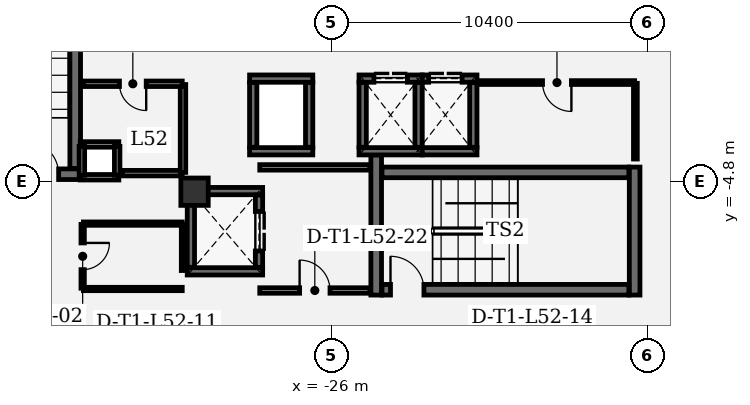
"""IFC4 building model, lengths in metres.
Left out: names, types, materials, properties, quantities, classifications, styles, units other than length and angle.
Written with IfcOpenShell. Run it as: python <this file> out.ifc"""

import sys

from ifc_helpers import new_model, si_unit, direction, frame, frame_2d, origin, origin_2d, place, context, subcontext, project, spatial, rectangle, extrude, element, fill, save


model = new_model("IFC4")
c1 = context("Model", 3, precision=1e-05, world=origin(), true_north=direction((0.0, 1.0)))
c2 = subcontext(c1, "Body", "Model", "MODEL_VIEW")
j1 = project(units=[si_unit("LENGTHUNIT", "METRE"), si_unit("PLANEANGLEUNIT", "RADIAN")], contexts=[c1])
p1 = place(None, origin())
s1 = spatial("IfcSite", under=j1, at=p1, CompositionType="ELEMENT")
p2 = place(p1, origin())
s2 = spatial("IfcBuilding", under=s1, at=p2, CompositionType="ELEMENT")
p3 = place(p2, frame((0.0, 0.0, 225.3)))
s3 = spatial("IfcBuildingStorey", under=s2, at=p3, CompositionType="ELEMENT", Elevation=225.3)
p4 = place(p3, frame((-30.5, -5.15, 0.0), z_axis=(0.0, 0.0, 1.0), x_axis=(1.0, 0.0, 0.0)))
e1 = element("IfcColumn", 1, at=p4, inside=s3, PredefinedType="COLUMN", context=c2, shape_type="SweptSolid", body=[
    extrude(rectangle(XDim=0.9, YDim=0.9, at=origin_2d()), origin(), (0.0, 0.0, 1.0), 4.05),
])
p5 = place(p3, frame((-24.525, -3.94, 0.0), z_axis=(0.0, 0.0, 1.0), x_axis=(0.0, -1.0, 0.0)))
e2 = element("IfcWall", 2, at=p5, inside=s3, PredefinedType="SHEAR", context=c2, shape_type="SweptSolid", body=[
    extrude(rectangle(XDim=4.61, YDim=0.35, at=frame_2d((2.305, 0.0))), origin(), (0.0, 0.0, 1.0), 3.78),
])
p6 = place(p3, frame((-16.025, -8.55, 0.0), z_axis=(0.0, 0.0, 1.0), x_axis=(0.0, 1.0, 0.0)))
e3 = element("IfcWall", 3, at=p6, inside=s3, PredefinedType="SHEAR", context=c2, shape_type="SweptSolid", body=[
    extrude(rectangle(XDim=4.21, YDim=0.35, at=frame_2d((2.105, 0.0))), origin(), (0.0, 0.0, 1.0), 3.78),
])
p7 = place(p3, frame((-24.335, -8.375, 0.0), z_axis=(0.0, 0.0, 1.0), x_axis=(1.0, 0.0, 0.0)))
e4 = element("IfcWall", 4, at=p7, inside=s3, PredefinedType="SHEAR", context=c2, shape_type="SweptSolid", body=[
    extrude(rectangle(XDim=8.12, YDim=0.35, at=frame_2d((4.06, 0.0))), origin(), (0.0, 0.0, 1.0), 3.78),
])
p8 = place(p7, frame((0.28, 0.0, 0.0)))
e5 = element("IfcOpeningElement", 5, at=p8, cuts=e4, PredefinedType="OPENING", context=c2, shape_type="SweptSolid", body=[
    extrude(rectangle(XDim=1.1, YDim=2.2, at=frame_2d((0.55, 1.1))), frame((0.0, 0.185, 0.0), z_axis=(0.0, -1.0, 0.0), x_axis=(1.0, 0.0, 0.0)), (0.0, 0.0, 1.0), 0.37),
])
p9 = place(p3, frame((-16.215, -4.515, 0.0), z_axis=(0.0, 0.0, 1.0), x_axis=(-1.0, 0.0, 0.0)))
e6 = element("IfcWall", 6, at=p9, inside=s3, PredefinedType="SHEAR", context=c2, shape_type="SweptSolid", body=[
    extrude(rectangle(XDim=8.12, YDim=0.35, at=frame_2d((4.06, 0.0))), origin(), (0.0, 0.0, 1.0), 3.78),
])
p10 = place(p3, frame((-38.46, -4.575, 0.0), z_axis=(0.0, 0.0, 1.0), x_axis=(1.0, 0.0, 0.0)))
e7 = element("IfcWall", 7, at=p10, inside=s3, PredefinedType="SHEAR", context=c2, shape_type="SweptSolid", body=[
    extrude(rectangle(XDim=4.21, YDim=0.35, at=frame_2d((2.105, 0.0))), origin(), (0.0, 0.0, 1.0), 3.78),
])
p11 = place(p10, frame((2.39, 0.0, 0.0)))
e8 = element("IfcOpeningElement", 8, at=p11, cuts=e7, PredefinedType="OPENING", context=c2, shape_type="SweptSolid", body=[
    extrude(rectangle(XDim=1.1, YDim=2.2, at=frame_2d((0.55, 1.1))), frame((0.0, 0.185, 0.0), z_axis=(0.0, -1.0, 0.0), x_axis=(1.0, 0.0, 0.0)), (0.0, 0.0, 1.0), 0.37),
])
p12 = place(p3, frame((-34.425, -4.385, 0.0), z_axis=(0.0, 0.0, 1.0), x_axis=(0.0, 1.0, 0.0)))
e9 = element("IfcWall", 9, at=p12, inside=s3, PredefinedType="SHEAR", context=c2, shape_type="SweptSolid", body=[
    extrude(rectangle(XDim=8.77, YDim=0.35, at=frame_2d((4.385, 0.0))), origin(), (0.0, 0.0, 1.0), 3.78),
])
for number, where, z_axis, x_axis in (
    (10, (-28.26, -7.77, 0.0), (0.0, 0.0, 1.0), (-1.0, 0.0, 0.0)),
    (11, (-30.74, -5.13, 0.0), (0.0, 0.0, 1.0), (1.0, 0.0, 0.0)),
):
    element("IfcWall", number, at=place(p3, frame(where, z_axis=z_axis, x_axis=x_axis)), inside=s3, PredefinedType="SHEAR", context=c2, shape_type="SweptSolid", body=[
        extrude(rectangle(XDim=2.48, YDim=0.24, at=frame_2d((1.24, 0.0))), origin(), (0.0, 0.0, 1.0), 3.78),
    ])
p13 = place(p3, frame((-30.62, -7.638, 0.0), z_axis=(0.0, 0.0, 1.0), x_axis=(0.0, 1.0, 0.0)))
e12 = element("IfcWall", 12, at=p13, inside=s3, PredefinedType="SHEAR", context=c2, shape_type="SweptSolid", body=[
    extrude(rectangle(XDim=2.376, YDim=0.24, at=frame_2d((1.188, 0.0))), origin(), (0.0, 0.0, 1.0), 3.78),
])
p14 = place(p3, frame((-28.38, -5.262, 0.0), z_axis=(0.0, 0.0, 1.0), x_axis=(0.0, -1.0, 0.0)))
e13 = element("IfcWall", 13, at=p14, inside=s3, PredefinedType="SHEAR", context=c2, shape_type="SweptSolid", body=[
    extrude(rectangle(XDim=2.376, YDim=0.24, at=frame_2d((1.188, 0.0))), origin(), (0.0, 0.0, 1.0), 3.78),
])
p15 = place(p14, frame((0.538, 0.0, 0.0)))
e14 = element("IfcOpeningElement", 14, at=p15, cuts=e13, PredefinedType="OPENING", context=c2, shape_type="SweptSolid", body=[
    extrude(rectangle(XDim=1.3, YDim=2.3, at=frame_2d((0.65, 1.15))), frame((0.0, 0.13, 0.0), z_axis=(0.0, -1.0, 0.0), x_axis=(1.0, 0.0, 0.0)), (0.0, 0.0, 1.0), 0.26),
])
for number, where, z_axis, x_axis in (
    (15, (-26.61, -3.82, 0.0), (0.0, 0.0, 1.0), (-1.0, 0.0, 0.0)),
    (16, (-28.69, -1.43, 0.0), (0.0, 0.0, 1.0), (1.0, 0.0, 0.0)),
):
    element("IfcWall", number, at=place(p3, frame(where, z_axis=z_axis, x_axis=x_axis)), inside=s3, PredefinedType="SHEAR", context=c2, shape_type="SweptSolid", body=[
        extrude(rectangle(XDim=2.08, YDim=0.24, at=frame_2d((1.04, 0.0))), origin(), (0.0, 0.0, 1.0), 3.78),
    ])
for number, where, z_axis, x_axis in (
    (17, (-28.57, -3.688, 0.0), (0.0, 0.0, 1.0), (0.0, 1.0, 0.0)),
    (18, (-26.73, -1.562, 0.0), (0.0, 0.0, 1.0), (0.0, -1.0, 0.0)),
):
    element("IfcWall", number, at=place(p3, frame(where, z_axis=z_axis, x_axis=x_axis)), inside=s3, PredefinedType="SHEAR", context=c2, shape_type="SweptSolid", body=[
        extrude(rectangle(XDim=2.126, YDim=0.24, at=frame_2d((1.063, 0.0))), origin(), (0.0, 0.0, 1.0), 3.78),
    ])
p16 = place(p3, frame((-23.01, -3.82, 0.0), z_axis=(0.0, 0.0, 1.0), x_axis=(-1.0, 0.0, 0.0)))
e19 = element("IfcWall", 19, at=p16, inside=s3, PredefinedType="SHEAR", context=c2, shape_type="SweptSolid", body=[
    extrude(rectangle(XDim=2.08, YDim=0.24, at=frame_2d((1.04, 0.0))), origin(), (0.0, 0.0, 1.0), 3.78),
])
p17 = place(p3, frame((-25.09, -1.43, 0.0), z_axis=(0.0, 0.0, 1.0), x_axis=(1.0, 0.0, 0.0)))
e20 = element("IfcWall", 20, at=p17, inside=s3, PredefinedType="SHEAR", context=c2, shape_type="SweptSolid", body=[
    extrude(rectangle(XDim=2.08, YDim=0.24, at=frame_2d((1.04, 0.0))), origin(), (0.0, 0.0, 1.0), 3.78),
])
p18 = place(p17, frame((0.49, 0.0, 0.0)))
e21 = element("IfcOpeningElement", 21, at=p18, cuts=e20, PredefinedType="OPENING", context=c2, shape_type="SweptSolid", body=[
    extrude(rectangle(XDim=1.1, YDim=2.2, at=frame_2d((0.55, 1.1))), frame((0.0, 0.13, 0.0), z_axis=(0.0, -1.0, 0.0), x_axis=(1.0, 0.0, 0.0)), (0.0, 0.0, 1.0), 0.26),
])
for number, where, z_axis, x_axis in (
    (22, (-24.97, -3.688, 0.0), (0.0, 0.0, 1.0), (0.0, 1.0, 0.0)),
    (23, (-23.13, -1.562, 0.0), (0.0, 0.0, 1.0), (0.0, -1.0, 0.0)),
):
    element("IfcWall", number, at=place(p3, frame(where, z_axis=z_axis, x_axis=x_axis)), inside=s3, PredefinedType="SHEAR", context=c2, shape_type="SweptSolid", body=[
        extrude(rectangle(XDim=2.126, YDim=0.24, at=frame_2d((1.063, 0.0))), origin(), (0.0, 0.0, 1.0), 3.78),
    ])
p19 = place(p3, frame((-21.21, -3.82, 0.0), z_axis=(0.0, 0.0, 1.0), x_axis=(-1.0, 0.0, 0.0)))
e24 = element("IfcWall", 24, at=p19, inside=s3, PredefinedType="SHEAR", context=c2, shape_type="SweptSolid", body=[
    extrude(rectangle(XDim=1.8, YDim=0.24, at=frame_2d((0.9, 0.0))), origin(), (0.0, 0.0, 1.0), 3.78),
])
p20 = place(p3, frame((-23.01, -1.43, 0.0), z_axis=(0.0, 0.0, 1.0), x_axis=(1.0, 0.0, 0.0)))
e25 = element("IfcWall", 25, at=p20, inside=s3, PredefinedType="SHEAR", context=c2, shape_type="SweptSolid", body=[
    extrude(rectangle(XDim=1.8, YDim=0.24, at=frame_2d((0.9, 0.0))), origin(), (0.0, 0.0, 1.0), 3.78),
])
p21 = place(p20, frame((0.21, 0.0, 0.0)))
e26 = element("IfcOpeningElement", 26, at=p21, cuts=e25, PredefinedType="OPENING", context=c2, shape_type="SweptSolid", body=[
    extrude(rectangle(XDim=1.1, YDim=2.2, at=frame_2d((0.55, 1.1))), frame((0.0, 0.13, 0.0), z_axis=(0.0, -1.0, 0.0), x_axis=(1.0, 0.0, 0.0)), (0.0, 0.0, 1.0), 0.26),
])
p22 = place(p3, frame((-21.33, -1.562, 0.0), z_axis=(0.0, 0.0, 1.0), x_axis=(0.0, -1.0, 0.0)))
e27 = element("IfcWall", 27, at=p22, inside=s3, PredefinedType="SHEAR", context=c2, shape_type="SweptSolid", body=[
    extrude(rectangle(XDim=2.126, YDim=0.24, at=frame_2d((1.063, 0.0))), origin(), (0.0, 0.0, 1.0), 3.78),
])
for number, where, z_axis, x_axis in (
    (28, (-32.99, -4.675, 0.0), (0.0, 0.0, 1.0), (-1.0, 0.0, 0.0)),
    (29, (-34.26, -3.595, 0.0), (0.0, 0.0, 1.0), (1.0, 0.0, 0.0)),
):
    element("IfcWall", number, at=place(p3, frame(where, z_axis=z_axis, x_axis=x_axis)), inside=s3, PredefinedType="PARTITIONING", context=c2, shape_type="SweptSolid", body=[
        extrude(rectangle(XDim=1.27, YDim=0.18, at=frame_2d((0.635, 0.0))), origin(), (0.0, 0.0, 1.0), 3.78),
    ])
for number, where, z_axis, x_axis in (
    (30, (-34.205, -4.61, 0.0), (0.0, 0.0, 1.0), (0.0, 1.0, 0.0)),
    (31, (-33.045, -3.66, 0.0), (0.0, 0.0, 1.0), (0.0, -1.0, 0.0)),
):
    element("IfcWall", number, at=place(p3, frame(where, z_axis=z_axis, x_axis=x_axis)), inside=s3, PredefinedType="PARTITIONING", context=c2, shape_type="SweptSolid", body=[
        extrude(rectangle(XDim=0.95, YDim=0.18, at=frame_2d((0.475, 0.0))), origin(), (0.0, 0.0, 1.0), 3.78),
    ])
p23 = place(p3, frame((-28.355, -8.4, 0.0), z_axis=(0.0, 0.0, 1.0), x_axis=(1.0, 0.0, 0.0)))
e32 = element("IfcWall", 32, at=p23, inside=s3, PredefinedType="PARTITIONING", context=c2, shape_type="SweptSolid", body=[
    extrude(rectangle(XDim=3.622, YDim=0.18, at=frame_2d((1.811, 0.0))), origin(), (0.0, 0.0, 1.0), 3.78),
])
p24 = place(p23, frame((1.311, 0.0, 0.0)))
e33 = element("IfcOpeningElement", 33, at=p24, cuts=e32, PredefinedType="OPENING", context=c2, shape_type="SweptSolid", body=[
    extrude(rectangle(XDim=1.0, YDim=2.15, at=frame_2d((0.5, 1.075))), frame((0.0, 0.1, 0.0), z_axis=(0.0, -1.0, 0.0), x_axis=(1.0, 0.0, 0.0)), (0.0, 0.0, 1.0), 0.2),
])
p25 = place(p3, frame((-24.733, -4.35, 0.0), z_axis=(0.0, 0.0, 1.0), x_axis=(-1.0, 0.0, 0.0)))
e34 = element("IfcWall", 34, at=p25, inside=s3, PredefinedType="PARTITIONING", context=c2, shape_type="SweptSolid", body=[
    extrude(rectangle(XDim=3.622, YDim=0.18, at=frame_2d((1.811, 0.0))), origin(), (0.0, 0.0, 1.0), 3.78),
])
p26 = place(p3, frame((-34.18, -6.225, 0.0), z_axis=(0.0, 0.0, 1.0), x_axis=(0.0, -1.0, 0.0)))
e35 = element("IfcWall", 35, at=p26, inside=s3, PredefinedType="PARTITIONING", context=c2, shape_type="SweptSolid", body=[
    extrude(rectangle(XDim=2.1, YDim=0.11, at=frame_2d((1.05, 0.0))), origin(), (0.0, 0.0, 1.0), 3.78),
])
p27 = place(p26, frame((0.61, 0.0, 0.0)))
e36 = element("IfcOpeningElement", 36, at=p27, cuts=e35, PredefinedType="OPENING", context=c2, shape_type="SweptSolid", body=[
    extrude(rectangle(XDim=0.88, YDim=2.1, at=frame_2d((0.44, 1.05))), frame((0.0, 0.065, 0.0), z_axis=(0.0, -1.0, 0.0), x_axis=(1.0, 0.0, 0.0)), (0.0, 0.0, 1.0), 0.13),
])
p28 = place(p3, frame((-34.155, -8.35, 0.0), z_axis=(0.0, 0.0, 1.0), x_axis=(1.0, 0.0, 0.0)))
e37 = element("IfcWall", 37, at=p28, inside=s3, PredefinedType="PARTITIONING", context=c2, shape_type="SweptSolid", body=[
    extrude(rectangle(XDim=3.25, YDim=0.11, at=frame_2d((1.625, 0.0))), origin(), (0.0, 0.0, 1.0), 3.344),
])
p29 = place(p3, frame((-30.88, -7.743, 0.0), z_axis=(0.0, 0.0, 1.0), x_axis=(0.0, 1.0, 0.0)))
e38 = element("IfcWall", 38, at=p29, inside=s3, PredefinedType="PARTITIONING", context=c2, shape_type="SweptSolid", body=[
    extrude(rectangle(XDim=1.518, YDim=0.11, at=frame_2d((0.759, 0.0))), origin(), (0.0, 0.0, 1.0), 3.78),
])
p30 = place(p3, frame((-30.905, -6.2, 0.0), z_axis=(0.0, 0.0, 1.0), x_axis=(-1.0, 0.0, 0.0)))
e39 = element("IfcWall", 39, at=p30, inside=s3, PredefinedType="PARTITIONING", context=c2, shape_type="SweptSolid", body=[
    extrude(rectangle(XDim=3.25, YDim=0.11, at=frame_2d((1.625, 0.0))), origin(), (0.0, 0.0, 1.0), 3.344),
])
p31 = place(p3, frame((-16.0, -4.075, 0.0), z_axis=(0.0, 0.0, 1.0), x_axis=(0.0, 1.0, 0.0)))
e40 = element("IfcWall", 40, at=p31, inside=s3, PredefinedType="PARTITIONING", context=c2, shape_type="SweptSolid", body=[
    extrude(rectangle(XDim=2.49, YDim=0.125, at=frame_2d((1.245, 0.0))), origin(), (0.0, 0.0, 1.0), 3.78),
])
p32 = place(p3, frame((-16.025, -1.56, 0.0), z_axis=(0.0, 0.0, 1.0), x_axis=(-1.0, 0.0, 0.0)))
e41 = element("IfcWall", 41, at=p32, inside=s3, PredefinedType="PARTITIONING", context=c2, shape_type="SweptSolid", body=[
    extrude(rectangle(XDim=5.109, YDim=0.125, at=frame_2d((2.554, 0.0))), origin(), (0.0, 0.0, 1.0), 3.78),
])
p33 = place(p32, frame((2.079, 0.0, 0.0)))
e42 = element("IfcOpeningElement", 42, at=p33, cuts=e41, PredefinedType="OPENING", context=c2, shape_type="SweptSolid", body=[
    extrude(rectangle(XDim=0.95, YDim=2.15, at=frame_2d((0.475, 1.075))), frame((0.0, 0.073, 0.0), z_axis=(0.0, -1.0, 0.0), x_axis=(1.0, 0.0, 0.0)), (0.0, 0.0, 1.0), 0.145),
])
p34 = place(p3, frame((-32.88, -4.54, 0.0), z_axis=(0.0, 0.0, 1.0), x_axis=(1.0, 0.0, 0.0)))
e43 = element("IfcWall", 43, at=p34, inside=s3, PredefinedType="PARTITIONING", context=c2, shape_type="SweptSolid", body=[
    extrude(rectangle(XDim=1.975, YDim=0.18, at=frame_2d((0.988, 0.0))), origin(), (0.0, 0.0, 1.0), 3.78),
])
p35 = place(p3, frame((-30.88, -4.515, 0.0), z_axis=(0.0, 0.0, 1.0), x_axis=(0.0, 1.0, 0.0)))
e44 = element("IfcWall", 44, at=p35, inside=s3, PredefinedType="PARTITIONING", context=c2, shape_type="SweptSolid", body=[
    extrude(rectangle(XDim=2.89, YDim=0.18, at=frame_2d((1.445, 0.0))), origin(), (0.0, 0.0, 1.0), 3.78),
])
p36 = place(p3, frame((-30.905, -1.6, 0.0), z_axis=(0.0, 0.0, 1.0), x_axis=(-1.0, 0.0, 0.0)))
e45 = element("IfcWall", 45, at=p36, inside=s3, PredefinedType="PARTITIONING", context=c2, shape_type="SweptSolid", body=[
    extrude(rectangle(XDim=3.25, YDim=0.18, at=frame_2d((1.625, 0.0))), origin(), (0.0, 0.0, 1.0), 3.78),
])
p37 = place(p36, frame((1.185, 0.0, 0.0)))
e46 = element("IfcOpeningElement", 46, at=p37, cuts=e45, PredefinedType="OPENING", context=c2, shape_type="SweptSolid", body=[
    extrude(rectangle(XDim=0.88, YDim=2.1, at=frame_2d((0.44, 1.05))), frame((0.0, 0.1, 0.0), z_axis=(0.0, -1.0, 0.0), x_axis=(1.0, 0.0, 0.0)), (0.0, 0.0, 1.0), 0.2),
])
p38 = place(p8, origin())
e47 = element("IfcDoor", 47, at=p38, inside=s3, OperationType="SINGLE_SWING_LEFT", PredefinedType="DOOR", context=c2, shape_type="SweptSolid", body=[
    extrude(rectangle(XDim=1.1, YDim=2.2, at=frame_2d((0.55, 1.1))), frame((0.0, 0.025, 0.0), z_axis=(0.0, -1.0, 0.0), x_axis=(1.0, 0.0, 0.0)), (0.0, 0.0, 1.0), 0.05),
])
fill(e5, e47)
p39 = place(p11, origin())
e48 = element("IfcDoor", 48, at=p39, inside=s3, OperationType="SINGLE_SWING_LEFT", PredefinedType="DOOR", context=c2, shape_type="SweptSolid", body=[
    extrude(rectangle(XDim=1.1, YDim=2.2, at=frame_2d((0.55, 1.1))), frame((0.0, 0.025, 0.0), z_axis=(0.0, -1.0, 0.0), x_axis=(1.0, 0.0, 0.0)), (0.0, 0.0, 1.0), 0.05),
])
fill(e8, e48)
p40 = place(p15, origin())
e49 = element("IfcDoor", 49, at=p40, inside=s3, OperationType="DOUBLE_DOOR_SLIDING", PredefinedType="DOOR", context=c2, shape_type="SweptSolid", body=[
    extrude(rectangle(XDim=1.3, YDim=2.3, at=frame_2d((0.65, 1.15))), frame((0.0, 0.025, 0.0), z_axis=(0.0, -1.0, 0.0), x_axis=(1.0, 0.0, 0.0)), (0.0, 0.0, 1.0), 0.05),
])
fill(e14, e49)
p41 = place(p18, origin())
e50 = element("IfcDoor", 50, at=p41, inside=s3, OperationType="DOUBLE_DOOR_SLIDING", PredefinedType="DOOR", context=c2, shape_type="SweptSolid", body=[
    extrude(rectangle(XDim=1.1, YDim=2.2, at=frame_2d((0.55, 1.1))), frame((0.0, 0.025, 0.0), z_axis=(0.0, -1.0, 0.0), x_axis=(1.0, 0.0, 0.0)), (0.0, 0.0, 1.0), 0.05),
])
fill(e21, e50)
p42 = place(p21, origin())
e51 = element("IfcDoor", 51, at=p42, inside=s3, OperationType="DOUBLE_DOOR_SLIDING", PredefinedType="DOOR", context=c2, shape_type="SweptSolid", body=[
    extrude(rectangle(XDim=1.1, YDim=2.2, at=frame_2d((0.55, 1.1))), frame((0.0, 0.025, 0.0), z_axis=(0.0, -1.0, 0.0), x_axis=(1.0, 0.0, 0.0)), (0.0, 0.0, 1.0), 0.05),
])
fill(e26, e51)
p43 = place(p27, origin())
e52 = element("IfcDoor", 52, at=p43, inside=s3, OperationType="SINGLE_SWING_LEFT", PredefinedType="DOOR", context=c2, shape_type="SweptSolid", body=[
    extrude(rectangle(XDim=0.88, YDim=2.1, at=frame_2d((0.44, 1.05))), frame((0.0, 0.025, 0.0), z_axis=(0.0, -1.0, 0.0), x_axis=(1.0, 0.0, 0.0)), (0.0, 0.0, 1.0), 0.05),
])
fill(e36, e52)
p44 = place(p33, origin())
e53 = element("IfcDoor", 53, at=p44, inside=s3, OperationType="SINGLE_SWING_LEFT", PredefinedType="DOOR", context=c2, shape_type="SweptSolid", body=[
    extrude(rectangle(XDim=0.95, YDim=2.15, at=frame_2d((0.475, 1.075))), frame((0.0, 0.025, 0.0), z_axis=(0.0, -1.0, 0.0), x_axis=(1.0, 0.0, 0.0)), (0.0, 0.0, 1.0), 0.05),
])
fill(e42, e53)
p45 = place(p37, origin())
e54 = element("IfcDoor", 54, at=p45, inside=s3, OperationType="SINGLE_SWING_LEFT", PredefinedType="DOOR", context=c2, shape_type="SweptSolid", body=[
    extrude(rectangle(XDim=0.88, YDim=2.1, at=frame_2d((0.44, 1.05))), frame((0.0, 0.025, 0.0), z_axis=(0.0, -1.0, 0.0), x_axis=(1.0, 0.0, 0.0)), (0.0, 0.0, 1.0), 0.05),
])
fill(e46, e54)
p46 = place(p24, origin())
e55 = element("IfcDoor", 55, at=p46, inside=s3, OperationType="SINGLE_SWING_LEFT", PredefinedType="DOOR", context=c2, shape_type="SweptSolid", body=[
    extrude(rectangle(XDim=1.0, YDim=2.15, at=frame_2d((0.5, 1.075))), frame((0.0, 0.025, 0.0), z_axis=(0.0, -1.0, 0.0), x_axis=(1.0, 0.0, 0.0)), (0.0, 0.0, 1.0), 0.05),
])
fill(e33, e55)
save(model, sys.argv[1])
